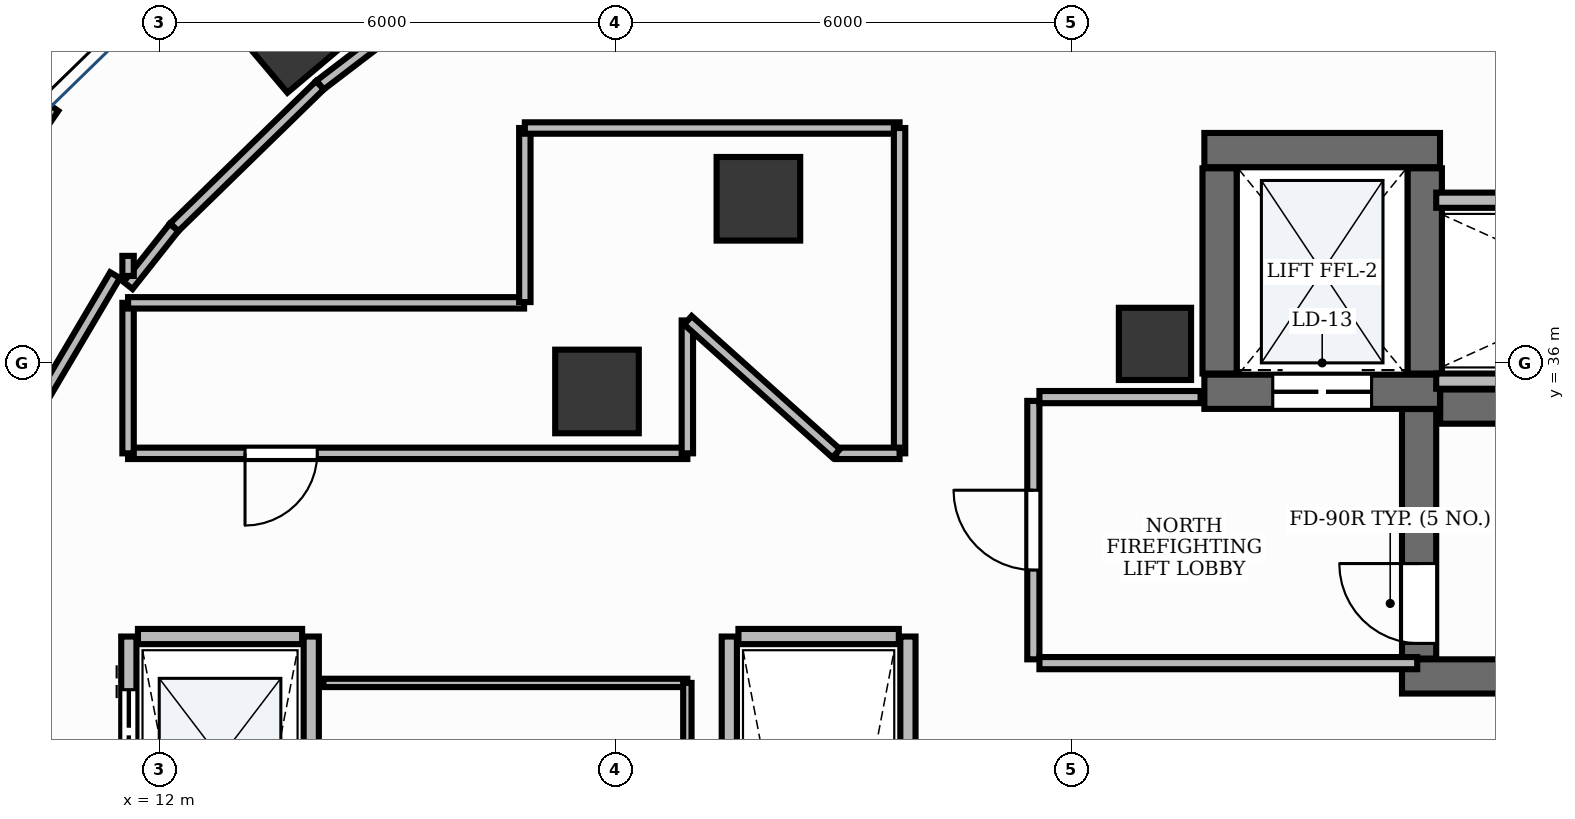
"""IFC4 building model, lengths in metres.
Left out: names, types, materials, properties, quantities, classifications, styles, units other than length and angle.
Written with IfcOpenShell. Run it as: python <this file> out.ifc"""

import sys

from ifc_helpers import new_model, si_unit, direction, frame, frame_2d, origin, origin_2d, place, context, subcontext, project, spatial, rectangle, extrude, element, fill, save


model = new_model("IFC4")
c1 = context("Model", 3, precision=1e-05, world=origin(), true_north=direction((0.0, 1.0)))
c2 = subcontext(c1, "Body", "Model", "MODEL_VIEW")
j1 = project(units=[si_unit("LENGTHUNIT", "METRE"), si_unit("PLANEANGLEUNIT", "RADIAN")], contexts=[c1])
p1 = place(None, origin())
s1 = spatial("IfcSite", under=j1, at=p1, CompositionType="ELEMENT")
p2 = place(p1, origin())
s2 = spatial("IfcBuilding", under=s1, at=p2, CompositionType="ELEMENT")
p3 = place(p2, frame((0.0, 0.0, 144.6)))
s3 = spatial("IfcBuildingStorey", under=s2, at=p3, CompositionType="ELEMENT", Elevation=144.6)
p4 = place(p3, frame((28.852, 35.425, 0.0), z_axis=(0.0, 0.0, 1.0), x_axis=(1.0, 0.0, 0.0)))
e1 = element("IfcWall", 1, at=p4, inside=s3, PredefinedType="SHEAR", context=c2, shape_type="SweptSolid", body=[
    extrude(rectangle(XDim=8.248, YDim=0.45, at=frame_2d((4.124, 0.0))), origin(), (0.0, 0.0, 1.0), 3.88),
])
p5 = place(p3, frame((28.35, 31.875, 0.0), z_axis=(0.0, 0.0, 1.0), x_axis=(1.0, 0.0, 0.0)))
e2 = element("IfcWall", 2, at=p5, inside=s3, PredefinedType="SHEAR", context=c2, shape_type="SweptSolid", body=[
    extrude(rectangle(XDim=8.75, YDim=0.45, at=frame_2d((4.375, 0.0))), origin(), (0.0, 0.0, 1.0), 3.88),
])
p6 = place(p3, frame((28.575, 32.11, 0.0), z_axis=(0.0, 0.0, 1.0), x_axis=(0.0, 1.0, 0.0)))
e3 = element("IfcWall", 3, at=p6, inside=s3, PredefinedType="SHEAR", context=c2, shape_type="SweptSolid", body=[
    extrude(rectangle(XDim=3.283, YDim=0.45, at=frame_2d((1.642, 0.0))), origin(), (0.0, 0.0, 1.0), 3.88),
])
p7 = place(p6, frame((0.2, 0.0, 0.0)))
e4 = element("IfcOpeningElement", 4, at=p7, cuts=e3, PredefinedType="OPENING", context=c2, shape_type="SweptSolid", body=[
    extrude(rectangle(XDim=1.05, YDim=2.15, at=frame_2d((0.525, 1.075))), frame((0.0, 0.24, 0.0), z_axis=(0.0, -1.0, 0.0), x_axis=(1.0, 0.0, 0.0)), (0.0, 0.0, 1.0), 0.48),
])
p8 = place(p3, frame((25.75, 38.8, 0.0), z_axis=(0.0, 0.0, 1.0), x_axis=(1.0, 0.0, 0.0)))
e5 = element("IfcWall", 5, at=p8, inside=s3, PredefinedType="SHEAR", context=c2, shape_type="SweptSolid", body=[
    extrude(rectangle(XDim=3.1, YDim=0.45, at=frame_2d((1.55, 0.0))), origin(), (0.0, 0.0, 1.0), 3.88),
])
p9 = place(p3, frame((25.75, 35.62, 0.0), z_axis=(0.0, 0.0, 1.0), x_axis=(1.0, 0.0, 0.0)))
e6 = element("IfcWall", 6, at=p9, inside=s3, PredefinedType="SHEAR", context=c2, shape_type="SweptSolid", body=[
    extrude(rectangle(XDim=3.1, YDim=0.45, at=frame_2d((1.55, 0.0))), origin(), (0.0, 0.0, 1.0), 3.88),
])
p10 = place(p9, frame((0.9, 0.0, 0.0)))
e7 = element("IfcOpeningElement", 7, at=p10, cuts=e6, PredefinedType="OPENING", context=c2, shape_type="SweptSolid", body=[
    extrude(rectangle(XDim=1.3, YDim=2.2, at=frame_2d((0.65, 1.1))), frame((0.0, 0.24, 0.0), z_axis=(0.0, -1.0, 0.0), x_axis=(1.0, 0.0, 0.0)), (0.0, 0.0, 1.0), 0.48),
])
for number, where, z_axis, x_axis in (
    (8, (25.95, 35.86, 0.0), (0.0, 0.0, 1.0), (0.0, 1.0, 0.0)),
    (9, (28.65, 35.86, 0.0), (0.0, 0.0, 1.0), (0.0, 1.0, 0.0)),
):
    element("IfcWall", number, at=place(p3, frame(where, z_axis=z_axis, x_axis=x_axis)), inside=s3, PredefinedType="SHEAR", context=c2, shape_type="SweptSolid", body=[
        extrude(rectangle(XDim=2.7, YDim=0.45, at=frame_2d((1.35, 0.0))), origin(), (0.0, 0.0, 1.0), 3.88),
    ])
p11 = place(p3, frame((25.1, 36.25, -0.0), z_axis=(0.0, 0.0, 1.0), x_axis=(1.0, 0.0, 0.0)))
e10 = element("IfcColumn", 10, at=p11, inside=s3, PredefinedType="PILASTER", context=c2, shape_type="SweptSolid", body=[
    extrude(rectangle(XDim=0.95, YDim=0.95, at=origin_2d()), origin(), (0.0, 0.0, 1.0), 3.881),
])
p12 = place(p3, frame((13.758, 40.4, -0.0), z_axis=(0.0, 0.0, 1.0), x_axis=(0.764246456939, 0.644924300253, 0.0)))
e11 = element("IfcColumn", 11, at=p12, inside=s3, PredefinedType="COLUMN", context=c2, shape_type="SweptSolid", body=[
    extrude(rectangle(XDim=1.2, YDim=1.2, at=origin_2d()), origin(), (0.0, 0.0, 1.0), 3.881),
])
for number, where, z_axis, x_axis in (
    (12, (19.883, 38.159, -0.0), (0.0, 0.0, 1.0), (1.0, 0.0, 0.0)),
    (13, (17.759, 35.624, -0.0), (0.0, 0.0, 1.0), (1.0, 0.0, 0.0)),
):
    element("IfcColumn", number, at=place(p3, frame(where, z_axis=z_axis, x_axis=x_axis)), inside=s3, PredefinedType="COLUMN", context=c2, shape_type="SweptSolid", body=[
        extrude(rectangle(XDim=1.1, YDim=1.1, at=origin_2d()), origin(), (0.0, 0.0, 1.0), 3.881),
    ])
p13 = place(p3, frame((10.548, 39.4, 0.0), z_axis=(0.0, 0.0, 1.0), x_axis=(-0.566825798999, -0.823837674296, 0.0)))
e14 = element("IfcWall", 14, at=p13, inside=s3, PredefinedType="STANDARD", context=c2, shape_type="SweptSolid", body=[
    extrude(rectangle(XDim=5.826, YDim=0.3, at=frame_2d((2.913, 0.0))), origin(), (0.0, 0.0, 1.0), 3.88),
])
p14 = place(p3, frame((11.6, 21.6, 0.0), z_axis=(0.0, 0.0, 1.0), x_axis=(0.0, 1.0, 0.0)))
e15 = element("IfcWall", 15, at=p14, inside=s3, PredefinedType="PARTITIONING", context=c2, shape_type="SweptSolid", body=[
    extrude(rectangle(XDim=10.8, YDim=0.2, at=frame_2d((5.4, 0.0))), origin(), (0.0, 0.0, 1.0), 2.22),
])
p15 = place(p14, frame((0.9, 0.0, 0.0)))
e16 = element("IfcOpeningElement", 16, at=p15, cuts=e15, PredefinedType="OPENING", context=c2, shape_type="SweptSolid", body=[
    extrude(rectangle(XDim=1.1, YDim=2.2, at=frame_2d((0.55, 1.1))), frame((0.0, 0.115, 0.0), z_axis=(0.0, -1.0, 0.0), x_axis=(1.0, 0.0, 0.0)), (0.0, 0.0, 1.0), 0.23),
])
p16 = place(p14, frame((3.6, 0.0, 0.0)))
e17 = element("IfcOpeningElement", 17, at=p16, cuts=e15, PredefinedType="OPENING", context=c2, shape_type="SweptSolid", body=[
    extrude(rectangle(XDim=1.1, YDim=2.2, at=frame_2d((0.55, 1.1))), frame((0.0, 0.115, 0.0), z_axis=(0.0, -1.0, 0.0), x_axis=(1.0, 0.0, 0.0)), (0.0, 0.0, 1.0), 0.23),
])
p17 = place(p14, frame((6.3, 0.0, 0.0)))
e18 = element("IfcOpeningElement", 18, at=p17, cuts=e15, PredefinedType="OPENING", context=c2, shape_type="SweptSolid", body=[
    extrude(rectangle(XDim=1.1, YDim=2.2, at=frame_2d((0.55, 1.1))), frame((0.0, 0.115, 0.0), z_axis=(0.0, -1.0, 0.0), x_axis=(1.0, 0.0, 0.0)), (0.0, 0.0, 1.0), 0.23),
])
p18 = place(p14, frame((9.0, 0.0, 0.0)))
e19 = element("IfcOpeningElement", 19, at=p18, cuts=e15, PredefinedType="OPENING", context=c2, shape_type="SweptSolid", body=[
    extrude(rectangle(XDim=1.1, YDim=2.2, at=frame_2d((0.55, 1.1))), frame((0.0, 0.115, 0.0), z_axis=(0.0, -1.0, 0.0), x_axis=(1.0, 0.0, 0.0)), (0.0, 0.0, 1.0), 0.23),
])
p19 = place(p3, frame((14.0, 21.6, 0.0), z_axis=(0.0, 0.0, 1.0), x_axis=(0.0, 1.0, 0.0)))
e20 = element("IfcWall", 20, at=p19, inside=s3, PredefinedType="PARTITIONING", context=c2, shape_type="SweptSolid", body=[
    extrude(rectangle(XDim=10.8, YDim=0.2, at=frame_2d((5.4, 0.0))), origin(), (0.0, 0.0, 1.0), 2.22),
])
p20 = place(p3, frame((11.72, 32.4, 0.0), z_axis=(0.0, 0.0, 1.0), x_axis=(1.0, 0.0, 0.0)))
e21 = element("IfcWall", 21, at=p20, inside=s3, PredefinedType="PARTITIONING", context=c2, shape_type="SweptSolid", body=[
    extrude(rectangle(XDim=2.16, YDim=0.2, at=frame_2d((1.08, 0.0))), origin(), (0.0, 0.0, 1.0), 2.22),
])
for number, where, z_axis, x_axis in (
    (22, (19.5, 21.6, 0.0), (0.0, 0.0, 1.0), (0.0, 1.0, 0.0)),
    (23, (21.85, 21.6, 0.0), (0.0, 0.0, 1.0), (0.0, 1.0, 0.0)),
):
    element("IfcWall", number, at=place(p3, frame(where, z_axis=z_axis, x_axis=x_axis)), inside=s3, PredefinedType="PARTITIONING", context=c2, shape_type="SweptSolid", body=[
        extrude(rectangle(XDim=10.8, YDim=0.2, at=frame_2d((5.4, 0.0))), origin(), (0.0, 0.0, 1.0), 2.22),
    ])
p21 = place(p3, frame((19.62, 32.4, 0.0), z_axis=(0.0, 0.0, 1.0), x_axis=(1.0, 0.0, 0.0)))
e24 = element("IfcWall", 24, at=p21, inside=s3, PredefinedType="PARTITIONING", context=c2, shape_type="SweptSolid", body=[
    extrude(rectangle(XDim=2.11, YDim=0.2, at=frame_2d((1.055, 0.0))), origin(), (0.0, 0.0, 1.0), 2.22),
])
for number, where, z_axis, x_axis in (
    (25, (28.8, 35.76, 0.0), (0.0, 0.0, 1.0), (1.0, 0.0, 0.0)),
    (26, (28.8, 38.14, 0.0), (0.0, 0.0, 1.0), (1.0, 0.0, 0.0)),
):
    element("IfcWall", number, at=place(p3, frame(where, z_axis=z_axis, x_axis=x_axis)), inside=s3, PredefinedType="PARTITIONING", context=c2, shape_type="SweptSolid", body=[
        extrude(rectangle(XDim=4.57, YDim=0.2, at=frame_2d((2.285, 0.0))), origin(), (0.0, 0.0, 1.0), 2.22),
    ])
p22 = place(p3, frame((23.5, 32.1, 0.0), z_axis=(0.0, 0.0, 1.0), x_axis=(0.0, 1.0, 0.0)))
e27 = element("IfcWall", 27, at=p22, inside=s3, PredefinedType="PARTITIONING", context=c2, shape_type="SweptSolid", body=[
    extrude(rectangle(XDim=3.4, YDim=0.16, at=frame_2d((1.7, 0.0))), origin(), (0.0, 0.0, 1.0), 2.22),
])
p23 = place(p22, frame((1.175, 0.0, 0.0)))
e28 = element("IfcOpeningElement", 28, at=p23, cuts=e27, PredefinedType="OPENING", context=c2, shape_type="SweptSolid", body=[
    extrude(rectangle(XDim=1.05, YDim=2.15, at=frame_2d((0.525, 1.075))), frame((0.0, 0.095, 0.0), z_axis=(0.0, -1.0, 0.0), x_axis=(1.0, 0.0, 0.0)), (0.0, 0.0, 1.0), 0.19),
])
p24 = place(p3, frame((23.58, 32.05, 0.0), z_axis=(0.0, 0.0, 1.0), x_axis=(1.0, 0.0, 0.0)))
e29 = element("IfcWall", 29, at=p24, inside=s3, PredefinedType="PARTITIONING", context=c2, shape_type="SweptSolid", body=[
    extrude(rectangle(XDim=4.97, YDim=0.16, at=frame_2d((2.485, 0.0))), origin(), (0.0, 0.0, 1.0), 2.22),
])
p25 = place(p3, frame((23.58, 35.55, 0.0), z_axis=(0.0, 0.0, 1.0), x_axis=(1.0, 0.0, 0.0)))
e30 = element("IfcWall", 30, at=p25, inside=s3, PredefinedType="PARTITIONING", context=c2, shape_type="SweptSolid", body=[
    extrude(rectangle(XDim=2.12, YDim=0.16, at=frame_2d((1.06, 0.0))), origin(), (0.0, 0.0, 1.0), 2.22),
])
p26 = place(p3, frame((18.948, 34.81, 0.0), z_axis=(0.0, 0.0, 1.0), x_axis=(-1.0, 0.0, 0.0)))
e31 = element("IfcWall", 31, at=p26, inside=s3, PredefinedType="PARTITIONING", context=c2, shape_type="SweptSolid", body=[
    extrude(rectangle(XDim=7.358, YDim=0.15, at=frame_2d((3.679, 0.0))), origin(), (0.0, 0.0, 1.0), 2.22),
])
p27 = place(p26, frame((4.869, 0.0, 0.0)))
e32 = element("IfcOpeningElement", 32, at=p27, cuts=e31, PredefinedType="OPENING", context=c2, shape_type="SweptSolid", body=[
    extrude(rectangle(XDim=0.95, YDim=2.15, at=frame_2d((0.475, 1.075))), frame((0.0, 0.09, 0.0), z_axis=(0.0, -1.0, 0.0), x_axis=(1.0, 0.0, 0.0)), (0.0, 0.0, 1.0), 0.18),
])
p28 = place(p3, frame((14.16, 31.79, 0.0), z_axis=(0.0, 0.0, 1.0), x_axis=(1.0, 0.0, 0.0)))
e33 = element("IfcWall", 33, at=p28, inside=s3, PredefinedType="MOVABLE", context=c2, shape_type="SweptSolid", body=[
    extrude(rectangle(XDim=4.788, YDim=0.11, at=frame_2d((2.394, 0.0))), origin(), (0.0, 0.0, 1.0), 2.22),
])
p29 = place(p3, frame((18.948, 31.79, 0.0), z_axis=(0.0, 0.0, 1.0), x_axis=(0.0, -1.0, 0.0)))
e34 = element("IfcWall", 34, at=p29, inside=s3, PredefinedType="MOVABLE", context=c2, shape_type="SweptSolid", body=[
    extrude(rectangle(XDim=0.938, YDim=0.11, at=frame_2d((0.469, 0.0))), origin(), (0.0, 0.0, 1.0), 2.22),
])
p30 = place(p3, frame((16.339, 41.354, 0.0), z_axis=(0.0, 0.0, 1.0), x_axis=(-0.794513779695, -0.607246122981, 0.0)))
e35 = element("IfcWall", 35, at=p30, inside=s3, PredefinedType="PARTITIONING", context=c2, shape_type="SweptSolid", body=[
    extrude(rectangle(XDim=2.799, YDim=0.15, at=frame_2d((1.399, 0.0))), origin(), (0.0, 0.0, 1.0), 2.22),
])
p31 = place(p3, frame((14.114, 39.653, 0.0), z_axis=(0.0, 0.0, 1.0), x_axis=(-0.716161838398, -0.697934252794, 0.0)))
e36 = element("IfcWall", 36, at=p31, inside=s3, PredefinedType="PARTITIONING", context=c2, shape_type="SweptSolid", body=[
    extrude(rectangle(XDim=2.679, YDim=0.15, at=frame_2d((1.339, 0.0))), origin(), (0.0, 0.0, 1.0), 2.22),
])
p32 = place(p3, frame((12.195, 37.782, 0.0), z_axis=(0.0, 0.0, 1.0), x_axis=(-0.621081637991, -0.783745876513, 0.0)))
e37 = element("IfcWall", 37, at=p32, inside=s3, PredefinedType="PARTITIONING", context=c2, shape_type="SweptSolid", body=[
    extrude(rectangle(XDim=0.974, YDim=0.15, at=frame_2d((0.487, 0.0))), origin(), (0.0, 0.0, 1.0), 2.22),
])
p33 = place(p3, frame((11.59, 37.144, 0.0), z_axis=(0.0, 0.0, 1.0), x_axis=(0.0, 1.0, 0.0)))
e38 = element("IfcWall", 38, at=p33, inside=s3, PredefinedType="PARTITIONING", context=c2, shape_type="SweptSolid", body=[
    extrude(rectangle(XDim=0.264, YDim=0.15, at=frame_2d((0.132, 0.0))), origin(), (0.0, 0.0, 1.0), 2.22),
])
p34 = place(p3, frame((11.419, 37.154, 0.0), z_axis=(0.0, 0.0, 1.0), x_axis=(-0.508183269016, -0.861248956511, 0.0)))
e39 = element("IfcWall", 39, at=p34, inside=s3, PredefinedType="PARTITIONING", context=c2, shape_type="SweptSolid", body=[
    extrude(rectangle(XDim=4.053, YDim=0.15, at=frame_2d((2.026, 0.0))), origin(), (0.0, 0.0, 1.0), 2.22),
])
p35 = place(p3, frame((18.948, 36.558, 0.0), z_axis=(0.0, 0.0, 1.0), x_axis=(0.0, -1.0, 0.0)))
e40 = element("IfcWall", 40, at=p35, inside=s3, PredefinedType="PARTITIONING", context=c2, shape_type="SweptSolid", body=[
    extrude(rectangle(XDim=1.748, YDim=0.15, at=frame_2d((0.874, 0.0))), origin(), (0.0, 0.0, 1.0), 2.22),
])
p36 = place(p3, frame((11.59, 34.81, 0.0), z_axis=(0.0, 0.0, 1.0), x_axis=(0.0, 1.0, 0.0)))
e41 = element("IfcWall", 41, at=p36, inside=s3, PredefinedType="PARTITIONING", context=c2, shape_type="SweptSolid", body=[
    extrude(rectangle(XDim=1.98, YDim=0.15, at=frame_2d((0.99, 0.0))), origin(), (0.0, 0.0, 1.0), 2.22),
])
p37 = place(p3, frame((11.59, 36.79, 0.0), z_axis=(0.0, 0.0, 1.0), x_axis=(1.0, 0.0, 0.0)))
e42 = element("IfcWall", 42, at=p37, inside=s3, PredefinedType="PARTITIONING", context=c2, shape_type="SweptSolid", body=[
    extrude(rectangle(XDim=5.21, YDim=0.15, at=frame_2d((2.605, 0.0))), origin(), (0.0, 0.0, 1.0), 2.22),
])
p38 = place(p3, frame((16.81, 36.8, 0.0), z_axis=(0.0, 0.0, 1.0), x_axis=(0.0, 1.0, 0.0)))
e43 = element("IfcWall", 43, at=p38, inside=s3, PredefinedType="PARTITIONING", context=c2, shape_type="SweptSolid", body=[
    extrude(rectangle(XDim=2.29, YDim=0.15, at=frame_2d((1.145, 0.0))), origin(), (0.0, 0.0, 1.0), 2.22),
])
p39 = place(p3, frame((16.81, 39.09, 0.0), z_axis=(0.0, 0.0, 1.0), x_axis=(1.0, 0.0, 0.0)))
e44 = element("IfcWall", 44, at=p39, inside=s3, PredefinedType="PARTITIONING", context=c2, shape_type="SweptSolid", body=[
    extrude(rectangle(XDim=4.93, YDim=0.15, at=frame_2d((2.465, 0.0))), origin(), (0.0, 0.0, 1.0), 2.22),
])
p40 = place(p3, frame((21.74, 39.09, 0.0), z_axis=(0.0, 0.0, 1.0), x_axis=(0.0, -1.0, 0.0)))
e45 = element("IfcWall", 45, at=p40, inside=s3, PredefinedType="PARTITIONING", context=c2, shape_type="SweptSolid", body=[
    extrude(rectangle(XDim=4.28, YDim=0.15, at=frame_2d((2.14, 0.0))), origin(), (0.0, 0.0, 1.0), 2.22),
])
p41 = place(p3, frame((21.74, 34.81, 0.0), z_axis=(0.0, 0.0, 1.0), x_axis=(-1.0, 0.0, 0.0)))
e46 = element("IfcWall", 46, at=p41, inside=s3, PredefinedType="PARTITIONING", context=c2, shape_type="SweptSolid", body=[
    extrude(rectangle(XDim=0.834, YDim=0.15, at=frame_2d((0.417, 0.0))), origin(), (0.0, 0.0, 1.0), 2.22),
])
p42 = place(p3, frame((20.906, 34.81, 0.0), z_axis=(0.0, 0.0, 1.0), x_axis=(-0.744339592711, 0.667801295838, 0.0)))
e47 = element("IfcWall", 47, at=p42, inside=s3, PredefinedType="PARTITIONING", context=c2, shape_type="SweptSolid", body=[
    extrude(rectangle(XDim=2.622, YDim=0.15, at=frame_2d((1.311, 0.0))), origin(), (0.0, 0.0, 1.0), 2.22),
])
p43 = place(p7, origin())
e48 = element("IfcDoor", 48, at=p43, inside=s3, OperationType="SINGLE_SWING_RIGHT", PredefinedType="DOOR", context=c2, shape_type="SweptSolid", body=[
    extrude(rectangle(XDim=1.05, YDim=2.15, at=frame_2d((0.525, 1.075))), frame((0.0, 0.025, 0.0), z_axis=(0.0, -1.0, 0.0), x_axis=(1.0, 0.0, 0.0)), (0.0, 0.0, 1.0), 0.05),
])
fill(e4, e48)
p44 = place(p18, origin())
e49 = element("IfcDoor", 49, at=p44, inside=s3, OperationType="DOUBLE_DOOR_SLIDING", PredefinedType="DOOR", context=c2, shape_type="SweptSolid", body=[
    extrude(rectangle(XDim=1.1, YDim=2.2, at=frame_2d((0.55, 1.1))), frame((0.0, 0.025, 0.0), z_axis=(0.0, -1.0, 0.0), x_axis=(1.0, 0.0, 0.0)), (0.0, 0.0, 1.0), 0.05),
])
fill(e19, e49)
p45 = place(p10, origin())
e50 = element("IfcDoor", 50, at=p45, inside=s3, OperationType="DOUBLE_DOOR_SLIDING", PredefinedType="DOOR", context=c2, shape_type="SweptSolid", body=[
    extrude(rectangle(XDim=1.3, YDim=2.2, at=frame_2d((0.65, 1.1))), frame((0.0, 0.025, 0.0), z_axis=(0.0, -1.0, 0.0), x_axis=(1.0, 0.0, 0.0)), (0.0, 0.0, 1.0), 0.05),
])
fill(e7, e50)
p46 = place(p23, origin())
e51 = element("IfcDoor", 51, at=p46, inside=s3, OperationType="SINGLE_SWING_RIGHT", PredefinedType="DOOR", context=c2, shape_type="SweptSolid", body=[
    extrude(rectangle(XDim=1.05, YDim=2.15, at=frame_2d((0.525, 1.075))), frame((0.0, 0.025, 0.0), z_axis=(0.0, -1.0, 0.0), x_axis=(1.0, 0.0, 0.0)), (0.0, 0.0, 1.0), 0.05),
])
fill(e28, e51)
p47 = place(p27, origin())
e52 = element("IfcDoor", 52, at=p47, inside=s3, OperationType="SINGLE_SWING_RIGHT", PredefinedType="DOOR", context=c2, shape_type="SweptSolid", body=[
    extrude(rectangle(XDim=0.95, YDim=2.15, at=frame_2d((0.475, 1.075))), frame((0.0, 0.025, 0.0), z_axis=(0.0, -1.0, 0.0), x_axis=(1.0, 0.0, 0.0)), (0.0, 0.0, 1.0), 0.05),
])
fill(e32, e52)
save(model, sys.argv[1])
